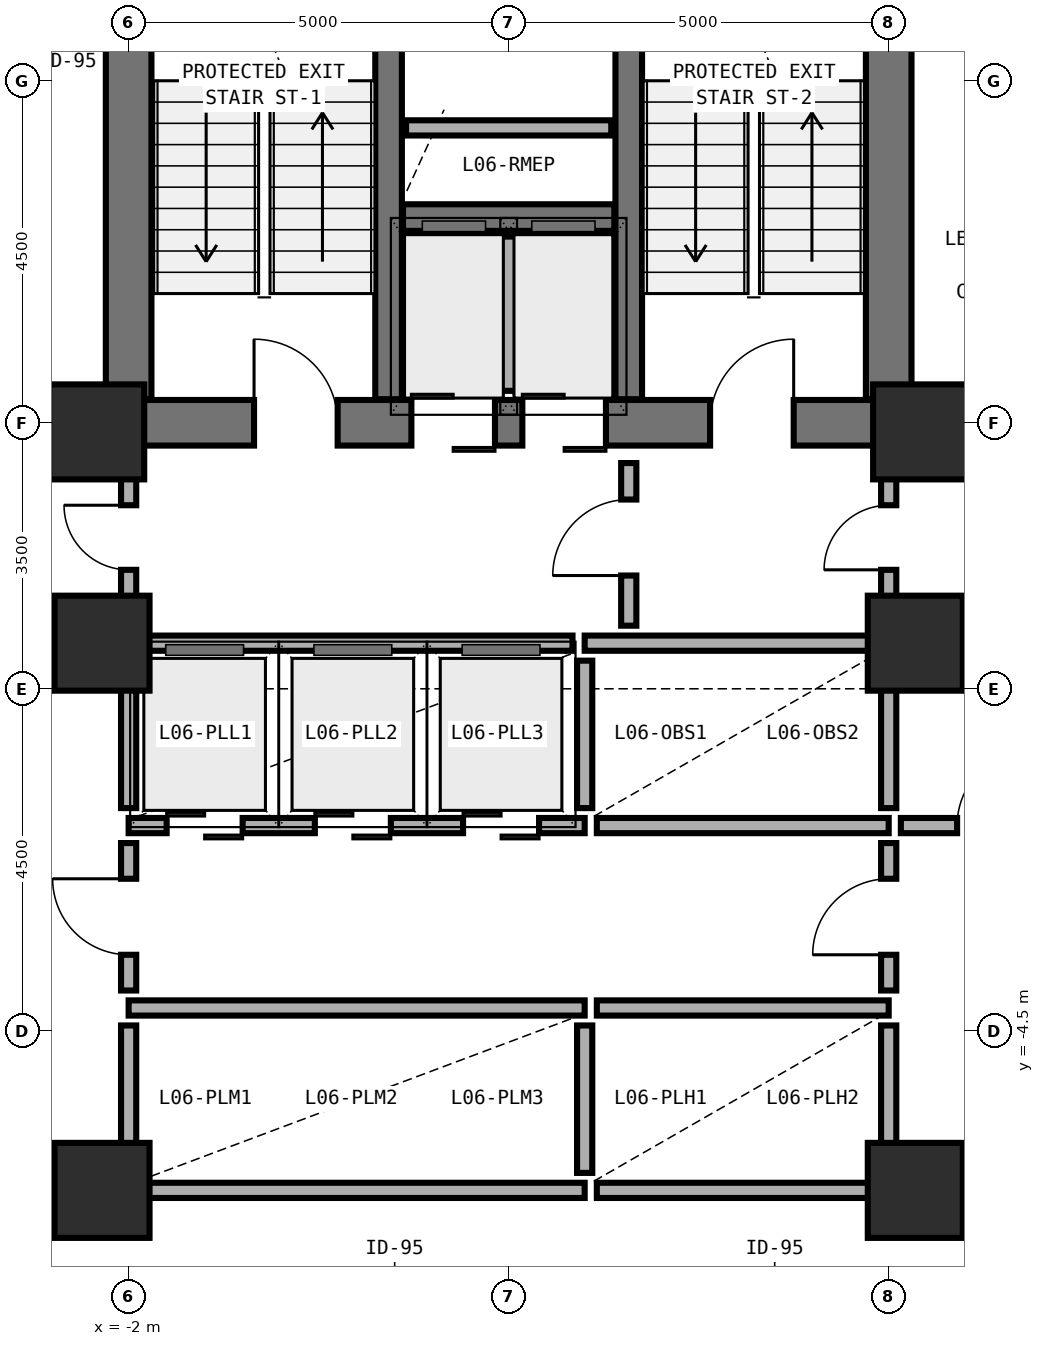
"""IFC4 building model, lengths in metres.
Left out: names, types, materials, properties, quantities, classifications, styles, units other than length and angle.
Written with IfcOpenShell. Run it as: python <this file> out.ifc"""

import sys

from ifc_helpers import new_model, si_unit, direction, frame, frame_2d, origin, origin_2d, place, context, subcontext, project, spatial, rectangle, extrude, element, fill, save


model = new_model("IFC4")
c1 = context("Model", 3, precision=1e-05, world=origin(), true_north=direction((0.0, 1.0)))
c2 = subcontext(c1, "Body", "Model", "MODEL_VIEW")
j1 = project(units=[si_unit("LENGTHUNIT", "METRE"), si_unit("PLANEANGLEUNIT", "RADIAN")], contexts=[c1])
p1 = place(None, origin())
s1 = spatial("IfcSite", under=j1, at=p1, CompositionType="ELEMENT")
p2 = place(p1, origin())
s2 = spatial("IfcBuilding", under=s1, at=p2, CompositionType="ELEMENT")
p3 = place(p2, frame((0.0, 0.0, 27.6)))
s3 = spatial("IfcBuildingStorey", under=s2, at=p3, CompositionType="ELEMENT", Elevation=27.6)
p4 = place(p3, frame((-2.0, 3.5, 0.0), z_axis=(0.0, 0.0, 1.0), x_axis=(1.0, 0.0, 0.0)))
e1 = element("IfcWall", 1, at=p4, inside=s3, PredefinedType="SHEAR", context=c2, shape_type="SweptSolid", body=[
    extrude(rectangle(XDim=10.0, YDim=0.6, at=frame_2d((5.0, 0.0))), origin(), (0.0, 0.0, 1.0), 3.892),
])
p5 = place(p4, frame((1.65, 0.0, 0.0)))
e2 = element("IfcOpeningElement", 2, at=p5, cuts=e1, PredefinedType="OPENING", context=c2, shape_type="SweptSolid", body=[
    extrude(rectangle(XDim=1.1, YDim=2.15, at=frame_2d((0.55, 1.075))), frame((0.0, 0.31, 0.0), z_axis=(0.0, -1.0, 0.0), x_axis=(1.0, 0.0, 0.0)), (0.0, 0.0, 1.0), 0.62),
])
p6 = place(p4, frame((7.65, 0.0, 0.0)))
e3 = element("IfcOpeningElement", 3, at=p6, cuts=e1, PredefinedType="OPENING", context=c2, shape_type="SweptSolid", body=[
    extrude(rectangle(XDim=1.1, YDim=2.15, at=frame_2d((0.55, 1.075))), frame((0.0, 0.31, 0.0), z_axis=(0.0, -1.0, 0.0), x_axis=(1.0, 0.0, 0.0)), (0.0, 0.0, 1.0), 0.62),
])
p7 = place(p4, frame((3.72, 0.0, 0.0)))
e4 = element("IfcOpeningElement", 4, at=p7, cuts=e1, PredefinedType="OPENING", context=c2, shape_type="SweptSolid", body=[
    extrude(rectangle(XDim=1.1, YDim=2.2, at=frame_2d((0.55, 1.1))), frame((0.0, 0.31, 0.0), z_axis=(0.0, -1.0, 0.0), x_axis=(1.0, 0.0, 0.0)), (0.0, 0.0, 1.0), 0.62),
])
p8 = place(p4, frame((5.18, 0.0, 0.0)))
e5 = element("IfcOpeningElement", 5, at=p8, cuts=e1, PredefinedType="OPENING", context=c2, shape_type="SweptSolid", body=[
    extrude(rectangle(XDim=1.1, YDim=2.2, at=frame_2d((0.55, 1.1))), frame((0.0, 0.31, 0.0), z_axis=(0.0, -1.0, 0.0), x_axis=(1.0, 0.0, 0.0)), (0.0, 0.0, 1.0), 0.62),
])
for number, where, z_axis, x_axis in (
    (6, (-2.0, 3.81, 0.0), (0.0, 0.0, 1.0), (0.0, 1.0, 0.0)),
    (7, (8.0, 3.81, 0.0), (0.0, 0.0, 1.0), (0.0, 1.0, 0.0)),
):
    element("IfcWall", number, at=place(p3, frame(where, z_axis=z_axis, x_axis=x_axis)), inside=s3, PredefinedType="SHEAR", context=c2, shape_type="SweptSolid", body=[
        extrude(rectangle(XDim=8.38, YDim=0.6, at=frame_2d((4.19, 0.0))), origin(), (0.0, 0.0, 1.0), 3.892),
    ])
for number, where, z_axis, x_axis in (
    (8, (1.42, 3.81, 0.0), (0.0, 0.0, 1.0), (0.0, 1.0, 0.0)),
    (9, (4.58, 3.81, 0.0), (0.0, 0.0, 1.0), (0.0, 1.0, 0.0)),
):
    element("IfcWall", number, at=place(p3, frame(where, z_axis=z_axis, x_axis=x_axis)), inside=s3, PredefinedType="SHEAR", context=c2, shape_type="SweptSolid", body=[
        extrude(rectangle(XDim=8.38, YDim=0.35, at=frame_2d((4.19, 0.0))), origin(), (0.0, 0.0, 1.0), 3.892),
    ])
p9 = place(p3, frame((1.61, 6.2, 0.0), z_axis=(0.0, 0.0, 1.0), x_axis=(1.0, 0.0, 0.0)))
e10 = element("IfcWall", 10, at=p9, inside=s3, PredefinedType="SHEAR", context=c2, shape_type="SweptSolid", body=[
    extrude(rectangle(XDim=2.78, YDim=0.35, at=frame_2d((1.39, 0.0))), origin(), (0.0, 0.0, 1.0), 3.892),
])
for number, where, z_axis, x_axis in (
    (11, (-2.42, 3.38, 0.0), (0.0, 0.0, 1.0), (1.0, 0.0, 0.0)),
    (12, (8.42, 3.38, 0.0), (0.0, 0.0, 1.0), (1.0, 0.0, 0.0)),
    (13, (-2.35, 0.6, 0.0), (0.0, 0.0, 1.0), (1.0, 0.0, 0.0)),
    (14, (8.35, 0.6, 0.0), (0.0, 0.0, 1.0), (1.0, 0.0, 0.0)),
    (15, (-2.35, -6.6, 0.0), (0.0, 0.0, 1.0), (1.0, 0.0, 0.0)),
    (16, (8.35, -6.6, 0.0), (0.0, 0.0, 1.0), (1.0, 0.0, 0.0)),
):
    element("IfcColumn", number, at=place(p3, frame(where, z_axis=z_axis, x_axis=x_axis)), inside=s3, PredefinedType="COLUMN", context=c2, shape_type="SweptSolid", body=[
        extrude(rectangle(XDim=1.25, YDim=1.25, at=origin_2d()), origin(), (0.0, 0.0, 1.0), 3.875),
    ])
p10 = place(p3, frame((3.0, 3.92, 0.0), z_axis=(0.0, 0.0, 1.0), x_axis=(0.0, 1.0, 0.0)))
e17 = element("IfcWall", 17, at=p10, inside=s3, PredefinedType="SOLIDWALL", context=c2, shape_type="SweptSolid", body=[
    extrude(rectangle(XDim=2.03, YDim=0.2, at=frame_2d((1.015, 0.0))), origin(), (0.0, 0.0, 1.0), 3.64),
])
p11 = place(p3, frame((1.65, 7.38, 0.0), z_axis=(0.0, 0.0, 1.0), x_axis=(1.0, 0.0, 0.0)))
e18 = element("IfcWall", 18, at=p11, inside=s3, PredefinedType="SOLIDWALL", context=c2, shape_type="SweptSolid", body=[
    extrude(rectangle(XDim=2.7, YDim=0.2, at=frame_2d((1.35, 0.0))), origin(), (0.0, 0.0, 1.0), 3.64),
])
p12 = place(p3, frame((4.0, 0.6, 0.0), z_axis=(0.0, 0.0, 1.0), x_axis=(1.0, 0.0, 0.0)))
e19 = element("IfcWall", 19, at=p12, inside=s3, PredefinedType="SOLIDWALL", context=c2, shape_type="SweptSolid", body=[
    extrude(rectangle(XDim=3.88, YDim=0.2, at=frame_2d((1.94, 0.0))), origin(), (0.0, 0.0, 1.0), 3.122),
])
p13 = place(p3, frame((-2.0, -1.8, 0.0), z_axis=(0.0, 0.0, 1.0), x_axis=(1.0, 0.0, 0.0)))
e20 = element("IfcWall", 20, at=p13, inside=s3, PredefinedType="SOLIDWALL", context=c2, shape_type="SweptSolid", body=[
    extrude(rectangle(XDim=6.0, YDim=0.2, at=frame_2d((3.0, 0.0))), origin(), (0.0, 0.0, 1.0), 3.64),
])
p14 = place(p13, frame((0.5, 0.0, 0.0)))
e21 = element("IfcOpeningElement", 21, at=p14, cuts=e20, PredefinedType="OPENING", context=c2, shape_type="SweptSolid", body=[
    extrude(rectangle(XDim=1.0, YDim=2.2, at=frame_2d((0.5, 1.1))), frame((0.0, 0.11, 0.0), z_axis=(0.0, -1.0, 0.0), x_axis=(1.0, 0.0, 0.0)), (0.0, 0.0, 1.0), 0.22),
])
p15 = place(p13, frame((2.45, 0.0, 0.0)))
e22 = element("IfcOpeningElement", 22, at=p15, cuts=e20, PredefinedType="OPENING", context=c2, shape_type="SweptSolid", body=[
    extrude(rectangle(XDim=1.0, YDim=2.2, at=frame_2d((0.5, 1.1))), frame((0.0, 0.11, 0.0), z_axis=(0.0, -1.0, 0.0), x_axis=(1.0, 0.0, 0.0)), (0.0, 0.0, 1.0), 0.22),
])
p16 = place(p13, frame((4.4, 0.0, 0.0)))
e23 = element("IfcOpeningElement", 23, at=p16, cuts=e20, PredefinedType="OPENING", context=c2, shape_type="SweptSolid", body=[
    extrude(rectangle(XDim=1.0, YDim=2.2, at=frame_2d((0.5, 1.1))), frame((0.0, 0.11, 0.0), z_axis=(0.0, -1.0, 0.0), x_axis=(1.0, 0.0, 0.0)), (0.0, 0.0, 1.0), 0.22),
])
p17 = place(p3, frame((-2.0, -1.57, 0.0), z_axis=(0.0, 0.0, 1.0), x_axis=(0.0, 1.0, 0.0)))
e24 = element("IfcWall", 24, at=p17, inside=s3, PredefinedType="SOLIDWALL", context=c2, shape_type="SweptSolid", body=[
    extrude(rectangle(XDim=2.05, YDim=0.2, at=frame_2d((1.025, 0.0))), origin(), (0.0, 0.0, 1.0), 3.022),
])
p18 = place(p3, frame((4.16, -1.8, 0.0), z_axis=(0.0, 0.0, 1.0), x_axis=(1.0, 0.0, 0.0)))
e25 = element("IfcWall", 25, at=p18, inside=s3, PredefinedType="SOLIDWALL", context=c2, shape_type="SweptSolid", body=[
    extrude(rectangle(XDim=3.84, YDim=0.2, at=frame_2d((1.92, 0.0))), origin(), (0.0, 0.0, 1.0), 3.64),
])
p19 = place(p3, frame((4.0, -1.57, 0.0), z_axis=(0.0, 0.0, 1.0), x_axis=(0.0, 1.0, 0.0)))
e26 = element("IfcWall", 26, at=p19, inside=s3, PredefinedType="SOLIDWALL", context=c2, shape_type="SweptSolid", body=[
    extrude(rectangle(XDim=1.94, YDim=0.2, at=frame_2d((0.97, 0.0))), origin(), (0.0, 0.0, 1.0), 3.64),
])
p20 = place(p3, frame((8.0, -1.57, 0.0), z_axis=(0.0, 0.0, 1.0), x_axis=(0.0, 1.0, 0.0)))
e27 = element("IfcWall", 27, at=p20, inside=s3, PredefinedType="SOLIDWALL", context=c2, shape_type="SweptSolid", body=[
    extrude(rectangle(XDim=2.05, YDim=0.2, at=frame_2d((1.025, 0.0))), origin(), (0.0, 0.0, 1.0), 3.072),
])
p21 = place(p3, frame((-2.0, -4.2, 0.0), z_axis=(0.0, 0.0, 1.0), x_axis=(1.0, 0.0, 0.0)))
e28 = element("IfcWall", 28, at=p21, inside=s3, PredefinedType="SOLIDWALL", context=c2, shape_type="SweptSolid", body=[
    extrude(rectangle(XDim=6.0, YDim=0.2, at=frame_2d((3.0, 0.0))), origin(), (0.0, 0.0, 1.0), 3.64),
])
p22 = place(p3, frame((-2.0, -6.6, 0.0), z_axis=(0.0, 0.0, 1.0), x_axis=(1.0, 0.0, 0.0)))
e29 = element("IfcWall", 29, at=p22, inside=s3, PredefinedType="SOLIDWALL", context=c2, shape_type="SweptSolid", body=[
    extrude(rectangle(XDim=6.0, YDim=0.2, at=frame_2d((3.0, 0.0))), origin(), (0.0, 0.0, 1.0), 3.122),
])
p23 = place(p3, frame((-2.0, -6.37, 0.0), z_axis=(0.0, 0.0, 1.0), x_axis=(0.0, 1.0, 0.0)))
e30 = element("IfcWall", 30, at=p23, inside=s3, PredefinedType="SOLIDWALL", context=c2, shape_type="SweptSolid", body=[
    extrude(rectangle(XDim=1.94, YDim=0.2, at=frame_2d((0.97, 0.0))), origin(), (0.0, 0.0, 1.0), 3.022),
])
p24 = place(p3, frame((4.16, -4.2, 0.0), z_axis=(0.0, 0.0, 1.0), x_axis=(1.0, 0.0, 0.0)))
e31 = element("IfcWall", 31, at=p24, inside=s3, PredefinedType="SOLIDWALL", context=c2, shape_type="SweptSolid", body=[
    extrude(rectangle(XDim=3.84, YDim=0.2, at=frame_2d((1.92, 0.0))), origin(), (0.0, 0.0, 1.0), 3.64),
])
p25 = place(p3, frame((4.16, -6.6, 0.0), z_axis=(0.0, 0.0, 1.0), x_axis=(1.0, 0.0, 0.0)))
e32 = element("IfcWall", 32, at=p25, inside=s3, PredefinedType="SOLIDWALL", context=c2, shape_type="SweptSolid", body=[
    extrude(rectangle(XDim=3.84, YDim=0.2, at=frame_2d((1.92, 0.0))), origin(), (0.0, 0.0, 1.0), 3.122),
])
p26 = place(p3, frame((4.0, -6.37, 0.0), z_axis=(0.0, 0.0, 1.0), x_axis=(0.0, 1.0, 0.0)))
e33 = element("IfcWall", 33, at=p26, inside=s3, PredefinedType="SOLIDWALL", context=c2, shape_type="SweptSolid", body=[
    extrude(rectangle(XDim=1.94, YDim=0.2, at=frame_2d((0.97, 0.0))), origin(), (0.0, 0.0, 1.0), 3.64),
])
p27 = place(p3, frame((8.0, -6.37, 0.0), z_axis=(0.0, 0.0, 1.0), x_axis=(0.0, 1.0, 0.0)))
e34 = element("IfcWall", 34, at=p27, inside=s3, PredefinedType="SOLIDWALL", context=c2, shape_type="SweptSolid", body=[
    extrude(rectangle(XDim=1.94, YDim=0.2, at=frame_2d((0.97, 0.0))), origin(), (0.0, 0.0, 1.0), 3.072),
])
p28 = place(p3, frame((4.58, 0.83, 0.0), z_axis=(0.0, 0.0, 1.0), x_axis=(0.0, 1.0, 0.0)))
e35 = element("IfcWall", 35, at=p28, inside=s3, PredefinedType="MOVABLE", context=c2, shape_type="SweptSolid", body=[
    extrude(rectangle(XDim=2.14, YDim=0.2, at=frame_2d((1.07, 0.0))), origin(), (0.0, 0.0, 1.0), 3.64),
])
p29 = place(p28, frame((0.66, 0.0, 0.0)))
e36 = element("IfcOpeningElement", 36, at=p29, cuts=e35, PredefinedType="OPENING", context=c2, shape_type="SweptSolid", body=[
    extrude(rectangle(XDim=1.0, YDim=2.1, at=frame_2d((0.5, 1.05))), frame((0.0, 0.11, 0.0), z_axis=(0.0, -1.0, 0.0), x_axis=(1.0, 0.0, 0.0)), (0.0, 0.0, 1.0), 0.22),
])
p30 = place(p3, frame((-2.0, 0.72, 0.0), z_axis=(0.0, 0.0, 1.0), x_axis=(0.0, 1.0, 0.0)))
e37 = element("IfcWall", 37, at=p30, inside=s3, PredefinedType="MOVABLE", context=c2, shape_type="SweptSolid", body=[
    extrude(rectangle(XDim=2.25, YDim=0.2, at=frame_2d((1.125, 0.0))), origin(), (0.0, 0.0, 1.0), 2.872),
])
p31 = place(p30, frame((0.845, 0.0, 0.0)))
e38 = element("IfcOpeningElement", 38, at=p31, cuts=e37, PredefinedType="OPENING", context=c2, shape_type="SweptSolid", body=[
    extrude(rectangle(XDim=0.85, YDim=2.1, at=frame_2d((0.425, 1.05))), frame((0.0, 0.11, 0.0), z_axis=(0.0, -1.0, 0.0), x_axis=(1.0, 0.0, 0.0)), (0.0, 0.0, 1.0), 0.22),
])
p32 = place(p3, frame((8.0, 0.72, 0.0), z_axis=(0.0, 0.0, 1.0), x_axis=(0.0, 1.0, 0.0)))
e39 = element("IfcWall", 39, at=p32, inside=s3, PredefinedType="MOVABLE", context=c2, shape_type="SweptSolid", body=[
    extrude(rectangle(XDim=2.25, YDim=0.2, at=frame_2d((1.125, 0.0))), origin(), (0.0, 0.0, 1.0), 2.872),
])
p33 = place(p32, frame((0.845, 0.0, 0.0)))
e40 = element("IfcOpeningElement", 40, at=p33, cuts=e39, PredefinedType="OPENING", context=c2, shape_type="SweptSolid", body=[
    extrude(rectangle(XDim=0.85, YDim=2.1, at=frame_2d((0.425, 1.05))), frame((0.0, 0.11, 0.0), z_axis=(0.0, -1.0, 0.0), x_axis=(1.0, 0.0, 0.0)), (0.0, 0.0, 1.0), 0.22),
])
p34 = place(p3, frame((-2.0, -3.97, 0.0), z_axis=(0.0, 0.0, 1.0), x_axis=(0.0, 1.0, 0.0)))
e41 = element("IfcWall", 41, at=p34, inside=s3, PredefinedType="MOVABLE", context=c2, shape_type="SweptSolid", body=[
    extrude(rectangle(XDim=1.94, YDim=0.2, at=frame_2d((0.97, 0.0))), origin(), (0.0, 0.0, 1.0), 3.022),
])
p35 = place(p34, frame((0.47, 0.0, 0.0)))
e42 = element("IfcOpeningElement", 42, at=p35, cuts=e41, PredefinedType="OPENING", context=c2, shape_type="SweptSolid", body=[
    extrude(rectangle(XDim=1.0, YDim=2.1, at=frame_2d((0.5, 1.05))), frame((0.0, 0.11, 0.0), z_axis=(0.0, -1.0, 0.0), x_axis=(1.0, 0.0, 0.0)), (0.0, 0.0, 1.0), 0.22),
])
p36 = place(p3, frame((8.0, -3.97, 0.0), z_axis=(0.0, 0.0, 1.0), x_axis=(0.0, 1.0, 0.0)))
e43 = element("IfcWall", 43, at=p36, inside=s3, PredefinedType="MOVABLE", context=c2, shape_type="SweptSolid", body=[
    extrude(rectangle(XDim=1.94, YDim=0.2, at=frame_2d((0.97, 0.0))), origin(), (0.0, 0.0, 1.0), 3.072),
])
p37 = place(p36, frame((0.47, 0.0, 0.0)))
e44 = element("IfcOpeningElement", 44, at=p37, cuts=e43, PredefinedType="OPENING", context=c2, shape_type="SweptSolid", body=[
    extrude(rectangle(XDim=1.0, YDim=2.1, at=frame_2d((0.5, 1.05))), frame((0.0, 0.11, 0.0), z_axis=(0.0, -1.0, 0.0), x_axis=(1.0, 0.0, 0.0)), (0.0, 0.0, 1.0), 0.22),
])
p38 = place(p3, frame((8.16, -1.8, 0.0), z_axis=(0.0, 0.0, 1.0), x_axis=(1.0, 0.0, 0.0)))
e45 = element("IfcWall", 45, at=p38, inside=s3, PredefinedType="MOVABLE", context=c2, shape_type="SweptSolid", body=[
    extrude(rectangle(XDim=2.64, YDim=0.2, at=frame_2d((1.32, 0.0))), origin(), (0.0, 0.0, 1.0), 3.64),
])
p39 = place(p38, frame((0.74, 0.0, 0.0)))
e46 = element("IfcOpeningElement", 46, at=p39, cuts=e45, PredefinedType="OPENING", context=c2, shape_type="SweptSolid", body=[
    extrude(rectangle(XDim=1.0, YDim=2.1, at=frame_2d((0.5, 1.05))), frame((0.0, 0.11, 0.0), z_axis=(0.0, -1.0, 0.0), x_axis=(1.0, 0.0, 0.0)), (0.0, 0.0, 1.0), 0.22),
])
p40 = place(p3, frame((-1.88, 0.6, 0.0), z_axis=(0.0, 0.0, 1.0), x_axis=(1.0, 0.0, 0.0)))
e47 = element("IfcWall", 47, at=p40, inside=s3, PredefinedType="MOVABLE", context=c2, shape_type="SweptSolid", body=[
    extrude(rectangle(XDim=5.72, YDim=0.2, at=frame_2d((2.86, 0.0))), origin(), (0.0, 0.0, 1.0), 3.122),
])
p41 = place(p5, origin())
e48 = element("IfcDoor", 48, at=p41, inside=s3, OperationType="SINGLE_SWING_LEFT", PredefinedType="DOOR", context=c2, shape_type="SweptSolid", body=[
    extrude(rectangle(XDim=1.1, YDim=2.15, at=frame_2d((0.55, 1.075))), frame((0.0, 0.025, 0.0), z_axis=(0.0, -1.0, 0.0), x_axis=(1.0, 0.0, 0.0)), (0.0, 0.0, 1.0), 0.05),
])
fill(e2, e48)
p42 = place(p6, origin())
e49 = element("IfcDoor", 49, at=p42, inside=s3, OperationType="SINGLE_SWING_RIGHT", PredefinedType="DOOR", context=c2, shape_type="SweptSolid", body=[
    extrude(rectangle(XDim=1.1, YDim=2.15, at=frame_2d((0.55, 1.075))), frame((0.0, 0.025, 0.0), z_axis=(0.0, -1.0, 0.0), x_axis=(1.0, 0.0, 0.0)), (0.0, 0.0, 1.0), 0.05),
])
fill(e3, e49)
p43 = place(p7, origin())
e50 = element("IfcDoor", 50, at=p43, inside=s3, OperationType="DOUBLE_DOOR_SLIDING", PredefinedType="DOOR", context=c2, shape_type="SweptSolid", body=[
    extrude(rectangle(XDim=1.1, YDim=2.2, at=frame_2d((0.55, 1.1))), frame((0.0, 0.025, 0.0), z_axis=(0.0, -1.0, 0.0), x_axis=(1.0, 0.0, 0.0)), (0.0, 0.0, 1.0), 0.05),
])
fill(e4, e50)
p44 = place(p8, origin())
e51 = element("IfcDoor", 51, at=p44, inside=s3, OperationType="DOUBLE_DOOR_SLIDING", PredefinedType="DOOR", context=c2, shape_type="SweptSolid", body=[
    extrude(rectangle(XDim=1.1, YDim=2.2, at=frame_2d((0.55, 1.1))), frame((0.0, 0.025, 0.0), z_axis=(0.0, -1.0, 0.0), x_axis=(1.0, 0.0, 0.0)), (0.0, 0.0, 1.0), 0.05),
])
fill(e5, e51)
p45 = place(p29, origin())
e52 = element("IfcDoor", 52, at=p45, inside=s3, OperationType="SINGLE_SWING_LEFT", PredefinedType="DOOR", context=c2, shape_type="SweptSolid", body=[
    extrude(rectangle(XDim=1.0, YDim=2.1, at=frame_2d((0.5, 1.05))), frame((0.0, 0.025, 0.0), z_axis=(0.0, -1.0, 0.0), x_axis=(1.0, 0.0, 0.0)), (0.0, 0.0, 1.0), 0.05),
])
fill(e36, e52)
p46 = place(p31, origin())
e53 = element("IfcDoor", 53, at=p46, inside=s3, OperationType="SINGLE_SWING_RIGHT", PredefinedType="DOOR", context=c2, shape_type="SweptSolid", body=[
    extrude(rectangle(XDim=0.85, YDim=2.1, at=frame_2d((0.425, 1.05))), frame((0.0, 0.025, 0.0), z_axis=(0.0, -1.0, 0.0), x_axis=(1.0, 0.0, 0.0)), (0.0, 0.0, 1.0), 0.05),
])
fill(e38, e53)
p47 = place(p33, origin())
e54 = element("IfcDoor", 54, at=p47, inside=s3, OperationType="SINGLE_SWING_LEFT", PredefinedType="DOOR", context=c2, shape_type="SweptSolid", body=[
    extrude(rectangle(XDim=0.85, YDim=2.1, at=frame_2d((0.425, 1.05))), frame((0.0, 0.025, 0.0), z_axis=(0.0, -1.0, 0.0), x_axis=(1.0, 0.0, 0.0)), (0.0, 0.0, 1.0), 0.05),
])
fill(e40, e54)
p48 = place(p35, origin())
e55 = element("IfcDoor", 55, at=p48, inside=s3, OperationType="SINGLE_SWING_RIGHT", PredefinedType="DOOR", context=c2, shape_type="SweptSolid", body=[
    extrude(rectangle(XDim=1.0, YDim=2.1, at=frame_2d((0.5, 1.05))), frame((0.0, 0.025, 0.0), z_axis=(0.0, -1.0, 0.0), x_axis=(1.0, 0.0, 0.0)), (0.0, 0.0, 1.0), 0.05),
])
fill(e42, e55)
p49 = place(p37, origin())
e56 = element("IfcDoor", 56, at=p49, inside=s3, OperationType="SINGLE_SWING_LEFT", PredefinedType="DOOR", context=c2, shape_type="SweptSolid", body=[
    extrude(rectangle(XDim=1.0, YDim=2.1, at=frame_2d((0.5, 1.05))), frame((0.0, 0.025, 0.0), z_axis=(0.0, -1.0, 0.0), x_axis=(1.0, 0.0, 0.0)), (0.0, 0.0, 1.0), 0.05),
])
fill(e44, e56)
p50 = place(p39, origin())
e57 = element("IfcDoor", 57, at=p50, inside=s3, OperationType="SINGLE_SWING_RIGHT", PredefinedType="DOOR", context=c2, shape_type="SweptSolid", body=[
    extrude(rectangle(XDim=1.0, YDim=2.1, at=frame_2d((0.5, 1.05))), frame((0.0, 0.025, 0.0), z_axis=(0.0, -1.0, 0.0), x_axis=(1.0, 0.0, 0.0)), (0.0, 0.0, 1.0), 0.05),
])
fill(e46, e57)
p51 = place(p14, origin())
e58 = element("IfcDoor", 58, at=p51, inside=s3, OperationType="DOUBLE_DOOR_SLIDING", PredefinedType="DOOR", context=c2, shape_type="SweptSolid", body=[
    extrude(rectangle(XDim=1.0, YDim=2.2, at=frame_2d((0.5, 1.1))), frame((0.0, 0.025, 0.0), z_axis=(0.0, -1.0, 0.0), x_axis=(1.0, 0.0, 0.0)), (0.0, 0.0, 1.0), 0.05),
])
fill(e21, e58)
p52 = place(p15, origin())
e59 = element("IfcDoor", 59, at=p52, inside=s3, OperationType="DOUBLE_DOOR_SLIDING", PredefinedType="DOOR", context=c2, shape_type="SweptSolid", body=[
    extrude(rectangle(XDim=1.0, YDim=2.2, at=frame_2d((0.5, 1.1))), frame((0.0, 0.025, 0.0), z_axis=(0.0, -1.0, 0.0), x_axis=(1.0, 0.0, 0.0)), (0.0, 0.0, 1.0), 0.05),
])
fill(e22, e59)
p53 = place(p16, origin())
e60 = element("IfcDoor", 60, at=p53, inside=s3, OperationType="DOUBLE_DOOR_SLIDING", PredefinedType="DOOR", context=c2, shape_type="SweptSolid", body=[
    extrude(rectangle(XDim=1.0, YDim=2.2, at=frame_2d((0.5, 1.1))), frame((0.0, 0.025, 0.0), z_axis=(0.0, -1.0, 0.0), x_axis=(1.0, 0.0, 0.0)), (0.0, 0.0, 1.0), 0.05),
])
fill(e23, e60)
save(model, sys.argv[1])
